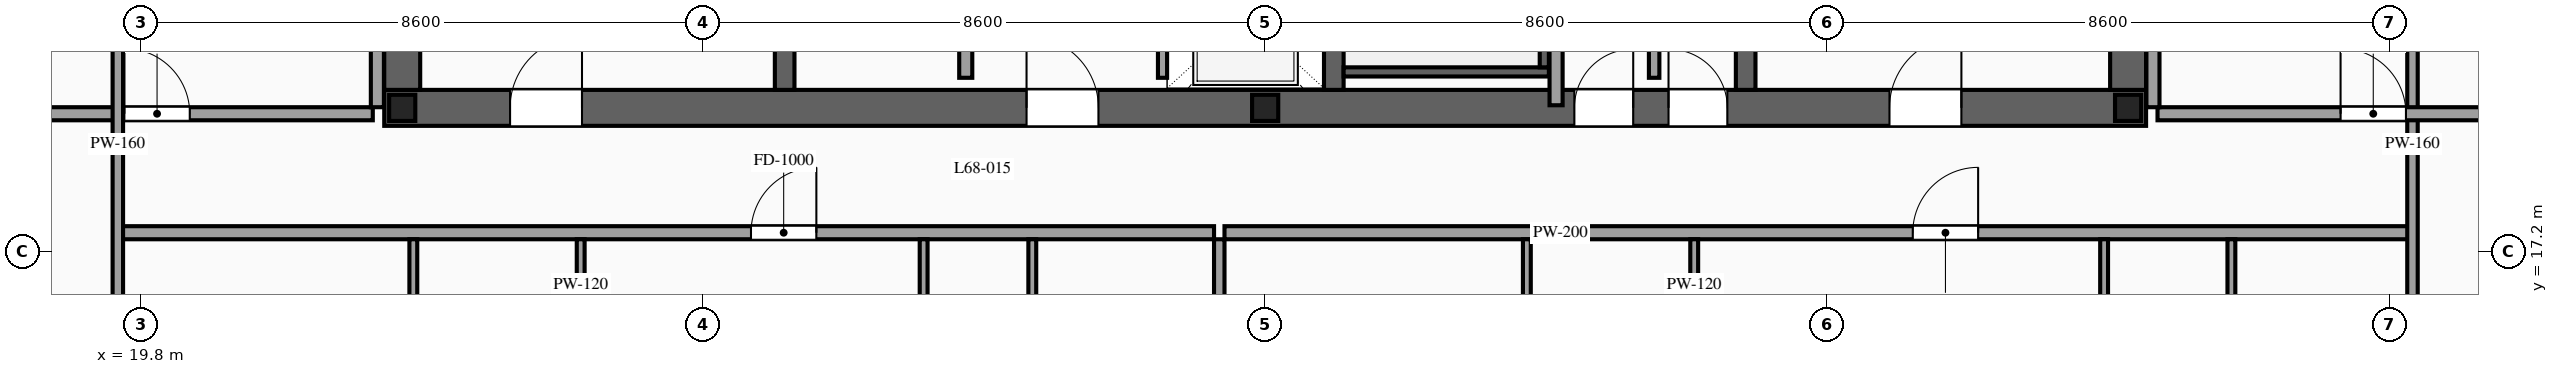
"""IFC4 building model, lengths in metres.
Left out: names, types, materials, properties, quantities, classifications, styles, units other than length and angle.
Written with IfcOpenShell. Run it as: python <this file> out.ifc"""

import sys

from ifc_helpers import new_model, si_unit, direction, frame, frame_2d, origin, origin_2d, place, context, subcontext, project, spatial, rectangle, i_section, extrude, source, transform, mapped, element, fill, save


model = new_model("IFC4")
c1 = context("Model", 3, precision=1e-05, world=origin(), true_north=direction((0.0, 1.0)))
c2 = subcontext(c1, "Body", "Model", "MODEL_VIEW")
j1 = project(units=[si_unit("LENGTHUNIT", "METRE"), si_unit("PLANEANGLEUNIT", "RADIAN")], contexts=[c1])
p1 = place(None, origin())
s1 = spatial("IfcSite", under=j1, at=p1, CompositionType="ELEMENT")
p2 = place(p1, origin())
s2 = spatial("IfcBuilding", under=s1, at=p2, CompositionType="ELEMENT")
p3 = place(p2, frame((0.0, 0.0, 255.6)))
s3 = spatial("IfcBuildingStorey", under=s2, at=p3, CompositionType="ELEMENT", Elevation=255.6)
p4 = place(p3, frame((23.525, 19.4, 0.0), z_axis=(0.0, 0.0, 1.0), x_axis=(1.0, 0.0, 0.0)))
e1 = element("IfcWall", 1, at=p4, inside=s3, PredefinedType="SHEAR", context=c2, shape_type="SweptSolid", body=[
    extrude(rectangle(XDim=26.95, YDim=0.55, at=frame_2d((13.475, 0.0))), origin(), (0.0, 0.0, 1.0), 3.5),
])
p5 = place(p4, frame((1.925, 0.0, 0.0)))
e2 = element("IfcOpeningElement", 2, at=p5, cuts=e1, PredefinedType="OPENING", context=c2, shape_type="SweptSolid", body=[
    extrude(rectangle(XDim=1.1, YDim=2.2, at=frame_2d((0.55, 1.1))), frame((0.0, 0.29, 0.0), z_axis=(0.0, -1.0, 0.0), x_axis=(1.0, 0.0, 0.0)), (0.0, 0.0, 1.0), 0.58),
])
p6 = place(p4, frame((9.825, 0.0, 0.0)))
e3 = element("IfcOpeningElement", 3, at=p6, cuts=e1, PredefinedType="OPENING", context=c2, shape_type="SweptSolid", body=[
    extrude(rectangle(XDim=1.1, YDim=2.2, at=frame_2d((0.55, 1.1))), frame((0.0, 0.29, 0.0), z_axis=(0.0, -1.0, 0.0), x_axis=(1.0, 0.0, 0.0)), (0.0, 0.0, 1.0), 0.58),
])
p7 = place(p4, frame((23.025, 0.0, 0.0)))
e4 = element("IfcOpeningElement", 4, at=p7, cuts=e1, PredefinedType="OPENING", context=c2, shape_type="SweptSolid", body=[
    extrude(rectangle(XDim=1.1, YDim=2.2, at=frame_2d((0.55, 1.1))), frame((0.0, 0.29, 0.0), z_axis=(0.0, -1.0, 0.0), x_axis=(1.0, 0.0, 0.0)), (0.0, 0.0, 1.0), 0.58),
])
p8 = place(p4, frame((19.645, 0.0, 0.0)))
e5 = element("IfcOpeningElement", 5, at=p8, cuts=e1, PredefinedType="OPENING", context=c2, shape_type="SweptSolid", body=[
    extrude(rectangle(XDim=0.9, YDim=2.15, at=frame_2d((0.45, 1.075))), frame((0.0, 0.29, 0.0), z_axis=(0.0, -1.0, 0.0), x_axis=(1.0, 0.0, 0.0)), (0.0, 0.0, 1.0), 0.58),
])
p9 = place(p4, frame((18.205, 0.0, 0.0)))
e6 = element("IfcOpeningElement", 6, at=p9, cuts=e1, PredefinedType="OPENING", context=c2, shape_type="SweptSolid", body=[
    extrude(rectangle(XDim=0.9, YDim=2.15, at=frame_2d((0.45, 1.075))), frame((0.0, 0.29, 0.0), z_axis=(0.0, -1.0, 0.0), x_axis=(1.0, 0.0, 0.0)), (0.0, 0.0, 1.0), 0.58),
])
m1 = source(origin(), c2, "Body", "SweptSolid", [
    extrude(rectangle(XDim=12.25, YDim=0.55, at=frame_2d((6.125, 0.0))), origin(), (0.0, 0.0, 1.0), 3.5),
])
for number, where, z_axis, x_axis in (
    (7, (23.8, 19.675, 0.0), (0.0, 0.0, 1.0), (0.0, 1.0, 0.0)),
    (8, (50.2, 19.675, 0.0), (0.0, 0.0, 1.0), (0.0, 1.0, 0.0)),
):
    element("IfcWall", number, at=place(p3, frame(where, z_axis=z_axis, x_axis=x_axis)), inside=s3, PredefinedType="SHEAR", context=c2, shape_type="MappedRepresentation", body=[
        mapped(m1, transform((0.0, 0.0, 0.0), scale=1.0)),
    ])
m2 = source(origin(), c2, "Body", "SweptSolid", [
    extrude(rectangle(XDim=12.25, YDim=0.3, at=frame_2d((6.125, 0.0))), origin(), (0.0, 0.0, 1.0), 3.5),
])
for number, where, z_axis, x_axis in (
    (9, (29.65, 19.675, 0.0), (0.0, 0.0, 1.0), (0.0, 1.0, 0.0)),
    (10, (38.05, 19.675, 0.0), (0.0, 0.0, 1.0), (0.0, 1.0, 0.0)),
    (11, (44.35, 19.675, 0.0), (0.0, 0.0, 1.0), (0.0, 1.0, 0.0)),
):
    element("IfcWall", number, at=place(p3, frame(where, z_axis=z_axis, x_axis=x_axis)), inside=s3, PredefinedType="SOLIDWALL", context=c2, shape_type="MappedRepresentation", body=[
        mapped(m2, transform((0.0, 0.0, 0.0), scale=1.0)),
    ])
m3 = source(origin(), c2, "Body", "SweptSolid", [
    extrude(i_section(OverallWidth=0.4, OverallDepth=0.4, WebThickness=0.013, FlangeThickness=0.021, at=origin_2d()), origin(), (0.0, 0.0, 1.0), 3.5),
])
for number, where, z_axis, x_axis in (
    (12, (23.8, 19.4, 0.0), (0.0, 0.0, 1.0), (1.0, 0.0, 0.0)),
    (13, (37.0, 19.4, 0.0), (0.0, 0.0, 1.0), (1.0, 0.0, 0.0)),
    (14, (50.2, 19.4, 0.0), (0.0, 0.0, 1.0), (1.0, 0.0, 0.0)),
):
    element("IfcColumn", number, at=place(p3, frame(where, z_axis=z_axis, x_axis=x_axis)), inside=s3, PredefinedType="COLUMN", context=c2, shape_type="MappedRepresentation", body=[
        mapped(m3, transform((0.0, 0.0, 0.0), scale=1.0)),
    ])
p10 = place(p3, frame((35.43, 19.86, 0.0), z_axis=(0.0, 0.0, 1.0), x_axis=(0.0, 1.0, 0.0)))
e15 = element("IfcWall", 15, at=p10, inside=s3, PredefinedType="SOLIDWALL", context=c2, shape_type="SweptSolid", body=[
    extrude(rectangle(XDim=2.04, YDim=0.14, at=frame_2d((1.02, 0.0))), origin(), (0.0, 0.0, 1.0), 3.2),
])
p11 = place(p10, frame((0.47, 0.0, 0.0)))
e16 = element("IfcOpeningElement", 16, at=p11, cuts=e15, PredefinedType="OPENING", context=c2, shape_type="SweptSolid", body=[
    extrude(rectangle(XDim=1.1, YDim=2.2, at=frame_2d((0.55, 1.1))), frame((0.0, 0.085, 0.0), z_axis=(0.0, -1.0, 0.0), x_axis=(1.0, 0.0, 0.0)), (0.0, 0.0, 1.0), 0.17),
])
m4 = source(origin(), c2, "Body", "SweptSolid", [
    extrude(rectangle(XDim=3.14, YDim=0.14, at=frame_2d((1.57, 0.0))), origin(), (0.0, 0.0, 1.0), 3.2),
])
p12 = place(p3, frame((38.2, 19.95, 0.0), z_axis=(0.0, 0.0, 1.0), x_axis=(1.0, 0.0, 0.0)))
e17 = element("IfcWall", 17, at=p12, inside=s3, PredefinedType="SOLIDWALL", context=c2, shape_type="MappedRepresentation", body=[
    mapped(m4, transform((0.0, 0.0, 0.0), scale=1.0)),
])
m5 = source(origin(), c2, "Body", "SweptSolid", [
    extrude(rectangle(XDim=8.94, YDim=0.14, at=frame_2d((4.47, 0.0))), origin(), (0.0, 0.0, 1.0), 3.2),
])
p13 = place(p3, frame((41.27, 20.02, 0.0), z_axis=(0.0, 0.0, 1.0), x_axis=(0.0, 1.0, 0.0)))
e18 = element("IfcWall", 18, at=p13, inside=s3, PredefinedType="SOLIDWALL", context=c2, shape_type="MappedRepresentation", body=[
    mapped(m5, transform((0.0, 0.0, 0.0), scale=1.0)),
])
p14 = place(p3, frame((32.42, 19.86, 0.0), z_axis=(0.0, 0.0, 1.0), x_axis=(0.0, 1.0, 0.0)))
e19 = element("IfcWall", 19, at=p14, inside=s3, PredefinedType="PARTITIONING", context=c2, shape_type="SweptSolid", body=[
    extrude(rectangle(XDim=3.94, YDim=0.2, at=frame_2d((1.97, 0.0))), origin(), (0.0, 0.0, 1.0), 3.2),
])
p15 = place(p14, frame((1.52, 0.0, 0.0)))
e20 = element("IfcOpeningElement", 20, at=p15, cuts=e19, PredefinedType="OPENING", context=c2, shape_type="SweptSolid", body=[
    extrude(rectangle(XDim=0.9, YDim=2.15, at=frame_2d((0.45, 1.075))), frame((0.0, 0.115, 0.0), z_axis=(0.0, -1.0, 0.0), x_axis=(1.0, 0.0, 0.0)), (0.0, 0.0, 1.0), 0.23),
])
m6 = source(origin(), c2, "Body", "SweptSolid", [
    extrude(rectangle(XDim=1.34, YDim=0.16, at=frame_2d((0.67, 0.0))), origin(), (0.0, 0.0, 1.0), 3.2),
])
p16 = place(p3, frame((42.95, 19.86, 0.0), z_axis=(0.0, 0.0, 1.0), x_axis=(0.0, 1.0, 0.0)))
e21 = element("IfcWall", 21, at=p16, inside=s3, PredefinedType="PARTITIONING", context=c2, shape_type="MappedRepresentation", body=[
    mapped(m6, transform((0.0, 0.0, 0.0), scale=1.0)),
])
m7 = source(origin(), c2, "Body", "SweptSolid", [
    extrude(rectangle(XDim=6.51, YDim=0.2, at=frame_2d((3.255, 0.0))), origin(), (0.0, 0.0, 1.0), 3.2),
])
p17 = place(p3, frame((41.45, 19.44, 0.0), z_axis=(0.0, 0.0, 1.0), x_axis=(0.0, 1.0, 0.0)))
e22 = element("IfcWall", 22, at=p17, inside=s3, PredefinedType="PARTITIONING", context=c2, shape_type="MappedRepresentation", body=[
    mapped(m7, transform((0.0, 0.0, 0.0), scale=1.0)),
])
p18 = place(p3, frame((19.44, 17.49, 0.0), z_axis=(0.0, 0.0, 1.0), x_axis=(1.0, 0.0, 0.0)))
e23 = element("IfcWall", 23, at=p18, inside=s3, PredefinedType="PARTITIONING", context=c2, shape_type="SweptSolid", body=[
    extrude(rectangle(XDim=16.778, YDim=0.2, at=frame_2d((8.389, 0.0))), origin(), (0.0, 0.0, 1.0), 3.2),
])
p19 = place(p18, frame((9.695, 0.0, 0.0)))
e24 = element("IfcOpeningElement", 24, at=p19, cuts=e23, PredefinedType="OPENING", context=c2, shape_type="SweptSolid", body=[
    extrude(rectangle(XDim=1.0, YDim=2.2, at=frame_2d((0.5, 1.1))), frame((0.0, 0.115, 0.0), z_axis=(0.0, -1.0, 0.0), x_axis=(1.0, 0.0, 0.0)), (0.0, 0.0, 1.0), 0.23),
])
m8 = source(origin(), c2, "Body", "SweptSolid", [
    extrude(rectangle(XDim=12.04, YDim=0.16, at=frame_2d((6.02, 0.0))), origin(), (0.0, 0.0, 1.0), 3.2),
])
p20 = place(p3, frame((36.298, 5.35, 0.0), z_axis=(0.0, 0.0, 1.0), x_axis=(0.0, 1.0, 0.0)))
e25 = element("IfcWall", 25, at=p20, inside=s3, PredefinedType="PARTITIONING", context=c2, shape_type="MappedRepresentation", body=[
    mapped(m8, transform((0.0, 0.0, 0.0), scale=1.0)),
])
m9 = source(origin(), c2, "Body", "SweptSolid", [
    extrude(rectangle(XDim=4.11, YDim=0.12, at=frame_2d((2.055, 0.0))), origin(), (0.0, 0.0, 1.0), 3.2),
])
p21 = place(p3, frame((23.97, 13.28, 0.0), z_axis=(0.0, 0.0, 1.0), x_axis=(0.0, 1.0, 0.0)))
e26 = element("IfcWall", 26, at=p21, inside=s3, PredefinedType="PARTITIONING", context=c2, shape_type="MappedRepresentation", body=[
    mapped(m9, transform((0.0, 0.0, 0.0), scale=1.0)),
])
p22 = place(p3, frame((26.53, 13.28, 0.0), z_axis=(0.0, 0.0, 1.0), x_axis=(0.0, 1.0, 0.0)))
e27 = element("IfcWall", 27, at=p22, inside=s3, PredefinedType="PARTITIONING", context=c2, shape_type="SweptSolid", body=[
    extrude(rectangle(XDim=4.11, YDim=0.12, at=frame_2d((2.055, 0.0))), origin(), (0.0, 0.0, 1.0), 3.2),
])
p23 = place(p22, frame((1.63, 0.0, 0.0)))
e28 = element("IfcOpeningElement", 28, at=p23, cuts=e27, PredefinedType="OPENING", context=c2, shape_type="SweptSolid", body=[
    extrude(rectangle(XDim=0.85, YDim=2.1, at=frame_2d((0.425, 1.05))), frame((0.0, 0.075, 0.0), z_axis=(0.0, -1.0, 0.0), x_axis=(1.0, 0.0, 0.0)), (0.0, 0.0, 1.0), 0.15),
])
for number, where, z_axis, x_axis in (
    (29, (33.438, 13.28, 0.0), (0.0, 0.0, 1.0), (0.0, 1.0, 0.0)),
    (30, (31.776, 13.28, 0.0), (0.0, 0.0, 1.0), (0.0, 1.0, 0.0)),
):
    element("IfcWall", number, at=place(p3, frame(where, z_axis=z_axis, x_axis=x_axis)), inside=s3, PredefinedType="PARTITIONING", context=c2, shape_type="MappedRepresentation", body=[
        mapped(m9, transform((0.0, 0.0, 0.0), scale=1.0)),
    ])
p24 = place(p3, frame((36.378, 17.49, 0.0), z_axis=(0.0, 0.0, 1.0), x_axis=(1.0, 0.0, 0.0)))
e31 = element("IfcWall", 31, at=p24, inside=s3, PredefinedType="PARTITIONING", context=c2, shape_type="SweptSolid", body=[
    extrude(rectangle(XDim=18.182, YDim=0.2, at=frame_2d((9.091, 0.0))), origin(), (0.0, 0.0, 1.0), 3.2),
])
p25 = place(p24, frame((10.528, 0.0, 0.0)))
e32 = element("IfcOpeningElement", 32, at=p25, cuts=e31, PredefinedType="OPENING", context=c2, shape_type="SweptSolid", body=[
    extrude(rectangle(XDim=1.0, YDim=2.2, at=frame_2d((0.5, 1.1))), frame((0.0, 0.115, 0.0), z_axis=(0.0, -1.0, 0.0), x_axis=(1.0, 0.0, 0.0)), (0.0, 0.0, 1.0), 0.23),
])
p26 = place(p3, frame((41.003, 13.28, 0.0), z_axis=(0.0, 0.0, 1.0), x_axis=(0.0, 1.0, 0.0)))
e33 = element("IfcWall", 33, at=p26, inside=s3, PredefinedType="PARTITIONING", context=c2, shape_type="MappedRepresentation", body=[
    mapped(m9, transform((0.0, 0.0, 0.0), scale=1.0)),
])
p27 = place(p3, frame((43.563, 13.28, 0.0), z_axis=(0.0, 0.0, 1.0), x_axis=(0.0, 1.0, 0.0)))
e34 = element("IfcWall", 34, at=p27, inside=s3, PredefinedType="PARTITIONING", context=c2, shape_type="SweptSolid", body=[
    extrude(rectangle(XDim=4.11, YDim=0.12, at=frame_2d((2.055, 0.0))), origin(), (0.0, 0.0, 1.0), 3.2),
])
p28 = place(p27, frame((1.63, 0.0, 0.0)))
e35 = element("IfcOpeningElement", 35, at=p28, cuts=e34, PredefinedType="OPENING", context=c2, shape_type="SweptSolid", body=[
    extrude(rectangle(XDim=0.85, YDim=2.1, at=frame_2d((0.425, 1.05))), frame((0.0, 0.075, 0.0), z_axis=(0.0, -1.0, 0.0), x_axis=(1.0, 0.0, 0.0)), (0.0, 0.0, 1.0), 0.15),
])
for number, where, z_axis, x_axis in (
    (36, (51.78, 13.28, 0.0), (0.0, 0.0, 1.0), (0.0, 1.0, 0.0)),
    (37, (49.833, 13.28, 0.0), (0.0, 0.0, 1.0), (0.0, 1.0, 0.0)),
):
    element("IfcWall", number, at=place(p3, frame(where, z_axis=z_axis, x_axis=x_axis)), inside=s3, PredefinedType="PARTITIONING", context=c2, shape_type="MappedRepresentation", body=[
        mapped(m9, transform((0.0, 0.0, 0.0), scale=1.0)),
    ])
p29 = place(p3, frame((16.55, 19.31, 0.0), z_axis=(0.0, 0.0, 1.0), x_axis=(1.0, 0.0, 0.0)))
e38 = element("IfcWall", 38, at=p29, inside=s3, PredefinedType="PARTITIONING", context=c2, shape_type="SweptSolid", body=[
    extrude(rectangle(XDim=6.8, YDim=0.2, at=frame_2d((3.4, 0.0))), origin(), (0.0, 0.0, 1.0), 2.745),
])
p30 = place(p29, frame((3.0, 0.0, 0.0)))
e39 = element("IfcOpeningElement", 39, at=p30, cuts=e38, PredefinedType="OPENING", context=c2, shape_type="SweptSolid", body=[
    extrude(rectangle(XDim=1.0, YDim=2.2, at=frame_2d((0.5, 1.1))), frame((0.0, 0.115, 0.0), z_axis=(0.0, -1.0, 0.0), x_axis=(1.0, 0.0, 0.0)), (0.0, 0.0, 1.0), 0.23),
])
m10 = source(origin(), c2, "Body", "SweptSolid", [
    extrude(rectangle(XDim=6.29, YDim=0.2, at=frame_2d((3.145, 0.0))), origin(), (0.0, 0.0, 1.0), 3.2),
])
p31 = place(p3, frame((23.42, 19.41, 0.0), z_axis=(0.0, 0.0, 1.0), x_axis=(0.0, 1.0, 0.0)))
e40 = element("IfcWall", 40, at=p31, inside=s3, PredefinedType="PARTITIONING", context=c2, shape_type="MappedRepresentation", body=[
    mapped(m10, transform((0.0, 0.0, 0.0), scale=1.0)),
])
m11 = source(origin(), c2, "Body", "SweptSolid", [
    extrude(rectangle(XDim=26.69, YDim=0.16, at=frame_2d((13.345, 0.0))), origin(), (0.0, 0.0, 1.0), 3.2),
])
for number, where, z_axis, x_axis in (
    (41, (19.45, 5.5, 0.0), (0.0, 0.0, 1.0), (0.0, 1.0, 0.0)),
    (42, (54.55, 5.5, 0.0), (0.0, 0.0, 1.0), (0.0, 1.0, 0.0)),
):
    element("IfcWall", number, at=place(p3, frame(where, z_axis=z_axis, x_axis=x_axis)), inside=s3, PredefinedType="PARTITIONING", context=c2, shape_type="MappedRepresentation", body=[
        mapped(m11, transform((0.0, 0.0, 0.0), scale=1.0)),
    ])
p32 = place(p3, frame((50.65, 19.31, 0.0), z_axis=(0.0, 0.0, 1.0), x_axis=(1.0, 0.0, 0.0)))
e43 = element("IfcWall", 43, at=p32, inside=s3, PredefinedType="PARTITIONING", context=c2, shape_type="SweptSolid", body=[
    extrude(rectangle(XDim=6.8, YDim=0.2, at=frame_2d((3.4, 0.0))), origin(), (0.0, 0.0, 1.0), 2.745),
])
p33 = place(p32, frame((2.8, 0.0, 0.0)))
e44 = element("IfcOpeningElement", 44, at=p33, cuts=e43, PredefinedType="OPENING", context=c2, shape_type="SweptSolid", body=[
    extrude(rectangle(XDim=1.0, YDim=2.2, at=frame_2d((0.5, 1.1))), frame((0.0, 0.115, 0.0), z_axis=(0.0, -1.0, 0.0), x_axis=(1.0, 0.0, 0.0)), (0.0, 0.0, 1.0), 0.23),
])
p34 = place(p3, frame((50.58, 19.41, 0.0), z_axis=(0.0, 0.0, 1.0), x_axis=(0.0, 1.0, 0.0)))
e45 = element("IfcWall", 45, at=p34, inside=s3, PredefinedType="PARTITIONING", context=c2, shape_type="MappedRepresentation", body=[
    mapped(m10, transform((0.0, 0.0, 0.0), scale=1.0)),
])
m12 = source(origin(), c2, "Body", "SweptSolid", [
    extrude(rectangle(XDim=1.1, YDim=2.2, at=frame_2d((0.55, 1.1))), frame((0.0, 0.025, 0.0), z_axis=(0.0, -1.0, 0.0), x_axis=(1.0, 0.0, 0.0)), (0.0, 0.0, 1.0), 0.05),
])
p35 = place(p5, origin())
e46 = element("IfcDoor", 46, at=p35, inside=s3, OperationType="SINGLE_SWING_RIGHT", PredefinedType="DOOR", context=c2, shape_type="MappedRepresentation", body=[
    mapped(m12, transform((0.0, 0.0, 0.0), scale=1.0)),
])
fill(e2, e46)
p36 = place(p6, origin())
e47 = element("IfcDoor", 47, at=p36, inside=s3, OperationType="SINGLE_SWING_LEFT", PredefinedType="DOOR", context=c2, shape_type="MappedRepresentation", body=[
    mapped(m12, transform((0.0, 0.0, 0.0), scale=1.0)),
])
fill(e3, e47)
p37 = place(p7, origin())
e48 = element("IfcDoor", 48, at=p37, inside=s3, OperationType="SINGLE_SWING_RIGHT", PredefinedType="DOOR", context=c2, shape_type="MappedRepresentation", body=[
    mapped(m12, transform((0.0, 0.0, 0.0), scale=1.0)),
])
fill(e4, e48)
m13 = source(origin(), c2, "Body", "SweptSolid", [
    extrude(rectangle(XDim=0.9, YDim=2.15, at=frame_2d((0.45, 1.075))), frame((0.0, 0.025, 0.0), z_axis=(0.0, -1.0, 0.0), x_axis=(1.0, 0.0, 0.0)), (0.0, 0.0, 1.0), 0.05),
])
p38 = place(p8, origin())
e49 = element("IfcDoor", 49, at=p38, inside=s3, OperationType="SINGLE_SWING_LEFT", PredefinedType="DOOR", context=c2, shape_type="MappedRepresentation", body=[
    mapped(m13, transform((0.0, 0.0, 0.0), scale=1.0)),
])
fill(e5, e49)
p39 = place(p9, origin())
e50 = element("IfcDoor", 50, at=p39, inside=s3, OperationType="SINGLE_SWING_RIGHT", PredefinedType="DOOR", context=c2, shape_type="MappedRepresentation", body=[
    mapped(m13, transform((0.0, 0.0, 0.0), scale=1.0)),
])
fill(e6, e50)
m14 = source(origin(), c2, "Body", "SweptSolid", [
    extrude(rectangle(XDim=1.0, YDim=2.2, at=frame_2d((0.5, 1.1))), frame((0.0, 0.025, 0.0), z_axis=(0.0, -1.0, 0.0), x_axis=(1.0, 0.0, 0.0)), (0.0, 0.0, 1.0), 0.05),
])
p40 = place(p19, origin())
e51 = element("IfcDoor", 51, at=p40, inside=s3, OperationType="SINGLE_SWING_RIGHT", PredefinedType="DOOR", context=c2, shape_type="MappedRepresentation", body=[
    mapped(m14, transform((0.0, 0.0, 0.0), scale=1.0)),
])
fill(e24, e51)
p41 = place(p25, origin())
e52 = element("IfcDoor", 52, at=p41, inside=s3, OperationType="SINGLE_SWING_RIGHT", PredefinedType="DOOR", context=c2, shape_type="MappedRepresentation", body=[
    mapped(m14, transform((0.0, 0.0, 0.0), scale=1.0)),
])
fill(e32, e52)
p42 = place(p30, origin())
e53 = element("IfcDoor", 53, at=p42, inside=s3, OperationType="SINGLE_SWING_LEFT", PredefinedType="DOOR", context=c2, shape_type="MappedRepresentation", body=[
    mapped(m14, transform((0.0, 0.0, 0.0), scale=1.0)),
])
fill(e39, e53)
p43 = place(p33, origin())
e54 = element("IfcDoor", 54, at=p43, inside=s3, OperationType="SINGLE_SWING_LEFT", PredefinedType="DOOR", context=c2, shape_type="MappedRepresentation", body=[
    mapped(m14, transform((0.0, 0.0, 0.0), scale=1.0)),
])
fill(e44, e54)
save(model, sys.argv[1])
